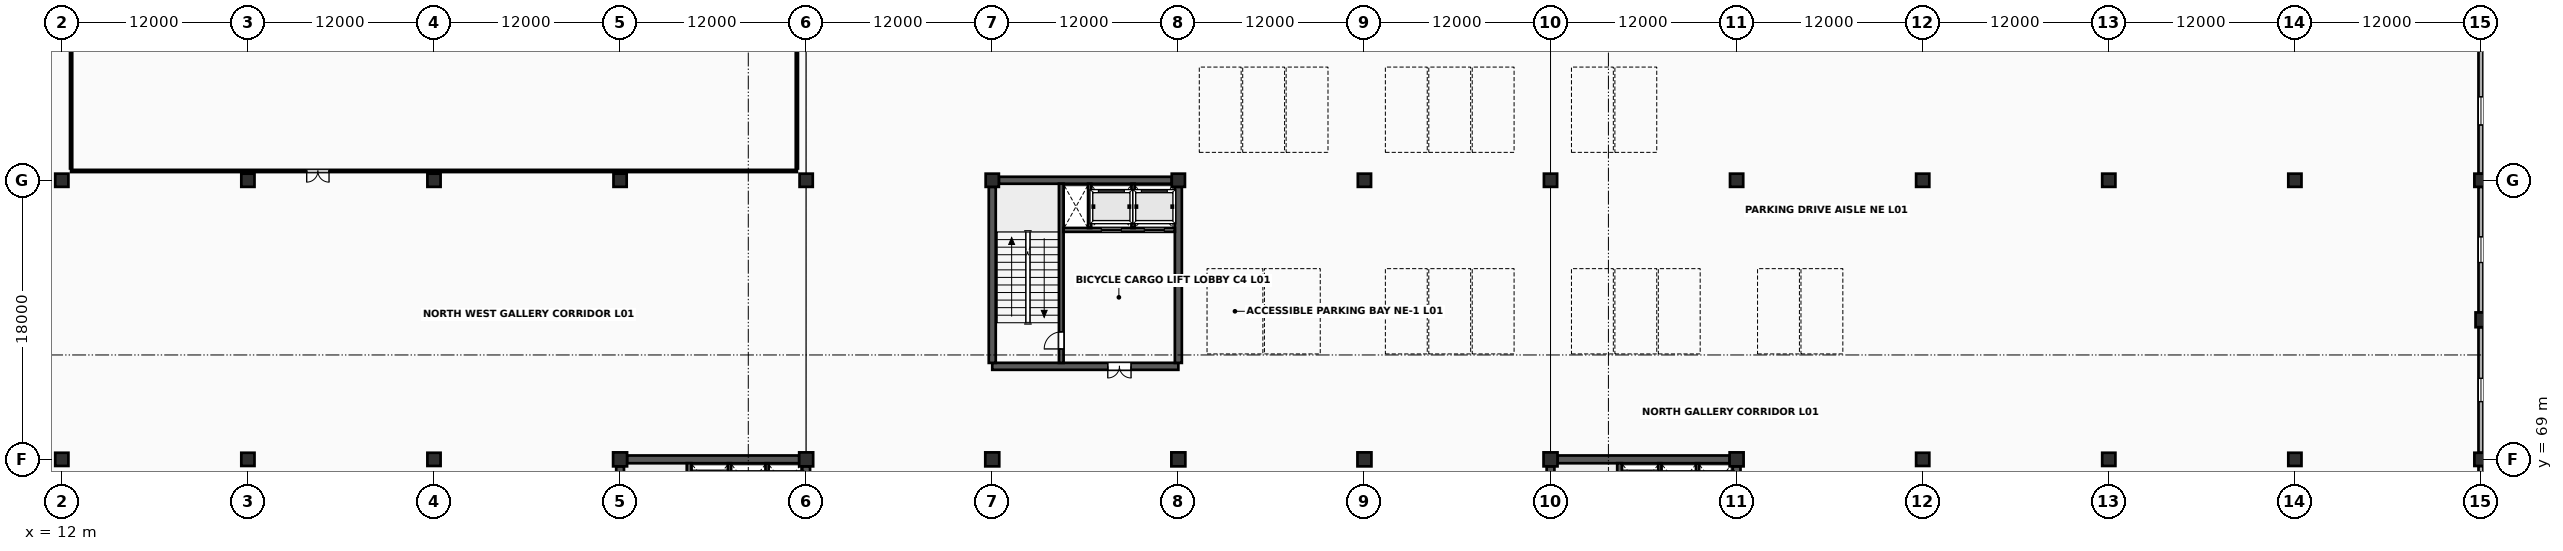
"""IFC4 building model, lengths in metres.
Left out: names, types, materials, properties, quantities, classifications, styles, units other than length and angle.
Written with IfcOpenShell. Run it as: python <this file> out.ifc"""

import sys

from ifc_helpers import new_model, si_unit, direction, frame, frame_2d, origin, origin_2d, place, context, subcontext, project, spatial, rectangle, extrude, element, fill, save


model = new_model("IFC4")
c1 = context("Model", 3, precision=1e-05, world=origin(), true_north=direction((0.0, 1.0)))
c2 = subcontext(c1, "Body", "Model", "MODEL_VIEW")
j1 = project(units=[si_unit("LENGTHUNIT", "METRE"), si_unit("PLANEANGLEUNIT", "RADIAN")], contexts=[c1])
p1 = place(None, origin())
s1 = spatial("IfcSite", under=j1, at=p1, CompositionType="ELEMENT")
p2 = place(p1, origin())
s2 = spatial("IfcBuilding", under=s1, at=p2, CompositionType="ELEMENT")
p3 = place(p2, frame((0.0, 0.0, 5.4)))
s3 = spatial("IfcBuildingStorey", under=s2, at=p3, CompositionType="ELEMENT", Elevation=5.4)
for number, where, z_axis, x_axis in (
    (1, (12.0, 69.0, 0.0), (0.0, 0.0, 1.0), (1.0, 0.0, 0.0)),
    (2, (12.0, 87.0, 0.0), (0.0, 0.0, 1.0), (1.0, 0.0, 0.0)),
    (3, (24.0, 69.0, 0.0), (0.0, 0.0, 1.0), (1.0, 0.0, 0.0)),
    (4, (24.0, 87.0, 0.0), (0.0, 0.0, 1.0), (1.0, 0.0, 0.0)),
    (5, (36.0, 69.0, 0.0), (0.0, 0.0, 1.0), (1.0, 0.0, 0.0)),
    (6, (36.0, 87.0, 0.0), (0.0, 0.0, 1.0), (1.0, 0.0, 0.0)),
):
    element("IfcColumn", number, at=place(p3, frame(where, z_axis=z_axis, x_axis=x_axis)), inside=s3, PredefinedType="COLUMN", context=c2, shape_type="SweptSolid", body=[
        extrude(rectangle(XDim=0.85, YDim=0.85, at=origin_2d()), origin(), (0.0, 0.0, 1.0), 4.2),
    ])
p4 = place(p3, frame((48.0, 69.0, 0.0), z_axis=(0.0, 0.0, 1.0), x_axis=(1.0, 0.0, 0.0)))
e7 = element("IfcColumn", 7, at=p4, inside=s3, PredefinedType="COLUMN", context=c2, shape_type="SweptSolid", body=[
    extrude(rectangle(XDim=0.9, YDim=0.9, at=origin_2d()), origin(), (0.0, 0.0, 1.0), 4.2),
])
p5 = place(p3, frame((48.0, 87.0, 0.0), z_axis=(0.0, 0.0, 1.0), x_axis=(1.0, 0.0, 0.0)))
e8 = element("IfcColumn", 8, at=p5, inside=s3, PredefinedType="COLUMN", context=c2, shape_type="SweptSolid", body=[
    extrude(rectangle(XDim=0.85, YDim=0.85, at=origin_2d()), origin(), (0.0, 0.0, 1.0), 4.2),
])
p6 = place(p3, frame((60.0, 69.0, 0.0), z_axis=(0.0, 0.0, 1.0), x_axis=(1.0, 0.0, 0.0)))
e9 = element("IfcColumn", 9, at=p6, inside=s3, PredefinedType="COLUMN", context=c2, shape_type="SweptSolid", body=[
    extrude(rectangle(XDim=0.9, YDim=0.9, at=origin_2d()), origin(), (0.0, 0.0, 1.0), 4.2),
])
p7 = place(p3, frame((60.0, 87.0, 0.0), z_axis=(0.0, 0.0, 1.0), x_axis=(1.0, 0.0, 0.0)))
e10 = element("IfcColumn", 10, at=p7, inside=s3, PredefinedType="COLUMN", context=c2, shape_type="SweptSolid", body=[
    extrude(rectangle(XDim=0.85, YDim=0.85, at=origin_2d()), origin(), (0.0, 0.0, 1.0), 4.2),
])
p8 = place(p3, frame((72.0, 69.0, 0.0), z_axis=(0.0, 0.0, 1.0), x_axis=(1.0, 0.0, 0.0)))
e11 = element("IfcColumn", 11, at=p8, inside=s3, PredefinedType="COLUMN", context=c2, shape_type="SweptSolid", body=[
    extrude(rectangle(XDim=0.9, YDim=0.9, at=origin_2d()), origin(), (0.0, 0.0, 1.0), 4.2),
])
p9 = place(p3, frame((72.0, 87.0, 0.0), z_axis=(0.0, 0.0, 1.0), x_axis=(1.0, 0.0, 0.0)))
e12 = element("IfcColumn", 12, at=p9, inside=s3, PredefinedType="COLUMN", context=c2, shape_type="SweptSolid", body=[
    extrude(rectangle(XDim=0.85, YDim=0.85, at=origin_2d()), origin(), (0.0, 0.0, 1.0), 4.2),
])
p10 = place(p3, frame((84.0, 69.0, 0.0), z_axis=(0.0, 0.0, 1.0), x_axis=(1.0, 0.0, 0.0)))
e13 = element("IfcColumn", 13, at=p10, inside=s3, PredefinedType="COLUMN", context=c2, shape_type="SweptSolid", body=[
    extrude(rectangle(XDim=0.9, YDim=0.9, at=origin_2d()), origin(), (0.0, 0.0, 1.0), 4.2),
])
p11 = place(p3, frame((84.0, 87.0, 0.0), z_axis=(0.0, 0.0, 1.0), x_axis=(1.0, 0.0, 0.0)))
e14 = element("IfcColumn", 14, at=p11, inside=s3, PredefinedType="COLUMN", context=c2, shape_type="SweptSolid", body=[
    extrude(rectangle(XDim=0.85, YDim=0.85, at=origin_2d()), origin(), (0.0, 0.0, 1.0), 4.2),
])
p12 = place(p3, frame((96.0, 69.0, 0.0), z_axis=(0.0, 0.0, 1.0), x_axis=(1.0, 0.0, 0.0)))
e15 = element("IfcColumn", 15, at=p12, inside=s3, PredefinedType="COLUMN", context=c2, shape_type="SweptSolid", body=[
    extrude(rectangle(XDim=0.9, YDim=0.9, at=origin_2d()), origin(), (0.0, 0.0, 1.0), 4.2),
])
p13 = place(p3, frame((96.0, 87.0, 0.0), z_axis=(0.0, 0.0, 1.0), x_axis=(1.0, 0.0, 0.0)))
e16 = element("IfcColumn", 16, at=p13, inside=s3, PredefinedType="COLUMN", context=c2, shape_type="SweptSolid", body=[
    extrude(rectangle(XDim=0.85, YDim=0.85, at=origin_2d()), origin(), (0.0, 0.0, 1.0), 4.2),
])
p14 = place(p3, frame((108.0, 69.0, 0.0), z_axis=(0.0, 0.0, 1.0), x_axis=(1.0, 0.0, 0.0)))
e17 = element("IfcColumn", 17, at=p14, inside=s3, PredefinedType="COLUMN", context=c2, shape_type="SweptSolid", body=[
    extrude(rectangle(XDim=0.9, YDim=0.9, at=origin_2d()), origin(), (0.0, 0.0, 1.0), 4.2),
])
p15 = place(p3, frame((108.0, 87.0, 0.0), z_axis=(0.0, 0.0, 1.0), x_axis=(1.0, 0.0, 0.0)))
e18 = element("IfcColumn", 18, at=p15, inside=s3, PredefinedType="COLUMN", context=c2, shape_type="SweptSolid", body=[
    extrude(rectangle(XDim=0.85, YDim=0.85, at=origin_2d()), origin(), (0.0, 0.0, 1.0), 4.2),
])
p16 = place(p3, frame((120.0, 69.0, 0.0), z_axis=(0.0, 0.0, 1.0), x_axis=(1.0, 0.0, 0.0)))
e19 = element("IfcColumn", 19, at=p16, inside=s3, PredefinedType="COLUMN", context=c2, shape_type="SweptSolid", body=[
    extrude(rectangle(XDim=0.9, YDim=0.9, at=origin_2d()), origin(), (0.0, 0.0, 1.0), 4.2),
])
for number, where, z_axis, x_axis in (
    (20, (120.0, 87.0, 0.0), (0.0, 0.0, 1.0), (1.0, 0.0, 0.0)),
    (21, (132.0, 69.0, 0.0), (0.0, 0.0, 1.0), (1.0, 0.0, 0.0)),
    (22, (132.0, 87.0, 0.0), (0.0, 0.0, 1.0), (1.0, 0.0, 0.0)),
    (23, (144.0, 69.0, 0.0), (0.0, 0.0, 1.0), (1.0, 0.0, 0.0)),
    (24, (144.0, 87.0, 0.0), (0.0, 0.0, 1.0), (1.0, 0.0, 0.0)),
    (25, (156.0, 69.0, 0.0), (0.0, 0.0, 1.0), (1.0, 0.0, 0.0)),
    (26, (156.0, 87.0, 0.0), (0.0, 0.0, 1.0), (1.0, 0.0, 0.0)),
    (27, (168.0, 69.0, 0.0), (0.0, 0.0, 1.0), (1.0, 0.0, 0.0)),
    (28, (168.0, 87.0, 0.0), (0.0, 0.0, 1.0), (1.0, 0.0, 0.0)),
):
    element("IfcColumn", number, at=place(p3, frame(where, z_axis=z_axis, x_axis=x_axis)), inside=s3, PredefinedType="COLUMN", context=c2, shape_type="SweptSolid", body=[
        extrude(rectangle(XDim=0.85, YDim=0.85, at=origin_2d()), origin(), (0.0, 0.0, 1.0), 4.2),
    ])
p17 = place(p3, frame((168.0, 78.0, 0.0), z_axis=(0.0, 0.0, 1.0), x_axis=(1.0, 0.0, 0.0)))
e29 = element("IfcColumn", 29, at=p17, inside=s3, PredefinedType="PILASTER", context=c2, shape_type="SweptSolid", body=[
    extrude(rectangle(XDim=0.7, YDim=0.95, at=origin_2d()), origin(), (0.0, 0.0, 1.0), 4.2),
])
for number, where, z_axis, x_axis in (
    (30, (48.447, 69.0, 0.0), (0.0, 0.0, 1.0), (1.0, 0.0, 0.0)),
    (31, (48.0, 57.447, 0.0), (0.0, 0.0, 1.0), (0.0, 1.0, 0.0)),
    (32, (60.0, 57.447, 0.0), (0.0, 0.0, 1.0), (0.0, 1.0, 0.0)),
):
    element("IfcWall", number, at=place(p3, frame(where, z_axis=z_axis, x_axis=x_axis)), inside=s3, PredefinedType="SHEAR", context=c2, shape_type="SweptSolid", body=[
        extrude(rectangle(XDim=11.106, YDim=0.5, at=frame_2d((5.553, 0.0))), origin(), (0.0, 0.0, 1.0), 4.043),
    ])
p18 = place(p3, frame((52.45, 57.247, 0.0), z_axis=(0.0, 0.0, 1.0), x_axis=(0.0, 1.0, 0.0)))
e33 = element("IfcWall", 33, at=p18, inside=s3, PredefinedType="SHEAR", context=c2, shape_type="SweptSolid", body=[
    extrude(rectangle(XDim=11.506, YDim=0.3, at=frame_2d((5.753, 0.0))), origin(), (0.0, 0.0, 1.0), 4.043),
])
p19 = place(p18, frame((0.9, 0.0, 0.0)))
e34 = element("IfcOpeningElement", 34, at=p19, cuts=e33, PredefinedType="OPENING", context=c2, shape_type="SweptSolid", body=[
    extrude(rectangle(XDim=1.1, YDim=2.2, at=frame_2d((0.55, 1.1))), frame((0.0, 0.165, 0.0), z_axis=(0.0, -1.0, 0.0), x_axis=(1.0, 0.0, 0.0)), (0.0, 0.0, 1.0), 0.33),
])
for number, where, z_axis, x_axis in (
    (35, (55.05, 65.92, 0.0), (0.0, 0.0, 1.0), (0.0, 1.0, 0.0)),
    (36, (57.48, 65.92, 0.0), (0.0, 0.0, 1.0), (0.0, 1.0, 0.0)),
):
    element("IfcWall", number, at=place(p3, frame(where, z_axis=z_axis, x_axis=x_axis)), inside=s3, PredefinedType="SOLIDWALL", context=c2, shape_type="SweptSolid", body=[
        extrude(rectangle(XDim=2.83, YDim=0.2, at=frame_2d((1.415, 0.0))), origin(), (0.0, 0.0, 1.0), 4.033),
    ])
for number, where, z_axis, x_axis in (
    (37, (108.447, 69.0, 0.0), (0.0, 0.0, 1.0), (1.0, 0.0, 0.0)),
    (38, (108.0, 57.447, 0.0), (0.0, 0.0, 1.0), (0.0, 1.0, 0.0)),
    (39, (120.0, 57.447, 0.0), (0.0, 0.0, 1.0), (0.0, 1.0, 0.0)),
):
    element("IfcWall", number, at=place(p3, frame(where, z_axis=z_axis, x_axis=x_axis)), inside=s3, PredefinedType="SHEAR", context=c2, shape_type="SweptSolid", body=[
        extrude(rectangle(XDim=11.106, YDim=0.5, at=frame_2d((5.553, 0.0))), origin(), (0.0, 0.0, 1.0), 4.043),
    ])
p20 = place(p3, frame((112.45, 57.247, 0.0), z_axis=(0.0, 0.0, 1.0), x_axis=(0.0, 1.0, 0.0)))
e40 = element("IfcWall", 40, at=p20, inside=s3, PredefinedType="SHEAR", context=c2, shape_type="SweptSolid", body=[
    extrude(rectangle(XDim=11.506, YDim=0.3, at=frame_2d((5.753, 0.0))), origin(), (0.0, 0.0, 1.0), 4.043),
])
p21 = place(p20, frame((0.9, 0.0, 0.0)))
e41 = element("IfcOpeningElement", 41, at=p21, cuts=e40, PredefinedType="OPENING", context=c2, shape_type="SweptSolid", body=[
    extrude(rectangle(XDim=1.1, YDim=2.2, at=frame_2d((0.55, 1.1))), frame((0.0, 0.165, 0.0), z_axis=(0.0, -1.0, 0.0), x_axis=(1.0, 0.0, 0.0)), (0.0, 0.0, 1.0), 0.33),
])
for number, where, z_axis, x_axis in (
    (42, (115.05, 65.92, 0.0), (0.0, 0.0, 1.0), (0.0, 1.0, 0.0)),
    (43, (117.48, 65.92, 0.0), (0.0, 0.0, 1.0), (0.0, 1.0, 0.0)),
):
    element("IfcWall", number, at=place(p3, frame(where, z_axis=z_axis, x_axis=x_axis)), inside=s3, PredefinedType="SOLIDWALL", context=c2, shape_type="SweptSolid", body=[
        extrude(rectangle(XDim=2.83, YDim=0.2, at=frame_2d((1.415, 0.0))), origin(), (0.0, 0.0, 1.0), 4.033),
    ])
p22 = place(p3, frame((72.0, 75.0, 0.0), z_axis=(0.0, 0.0, 1.0), x_axis=(1.0, 0.0, 0.0)))
e44 = element("IfcWall", 44, at=p22, inside=s3, PredefinedType="SHEAR", context=c2, shape_type="SweptSolid", body=[
    extrude(rectangle(XDim=12.0, YDim=0.45, at=frame_2d((6.0, 0.0))), origin(), (0.0, 0.0, 1.0), 4.043),
])
p23 = place(p22, frame((7.45, 0.0, 0.0)))
e45 = element("IfcOpeningElement", 45, at=p23, cuts=e44, PredefinedType="OPENING", context=c2, shape_type="SweptSolid", body=[
    extrude(rectangle(XDim=1.5, YDim=2.25, at=frame_2d((0.75, 1.125))), frame((0.0, 0.24, 0.0), z_axis=(0.0, -1.0, 0.0), x_axis=(1.0, 0.0, 0.0)), (0.0, 0.0, 1.0), 0.48),
])
p24 = place(p3, frame((72.422, 87.0, 0.0), z_axis=(0.0, 0.0, 1.0), x_axis=(1.0, 0.0, 0.0)))
e46 = element("IfcWall", 46, at=p24, inside=s3, PredefinedType="SHEAR", context=c2, shape_type="SweptSolid", body=[
    extrude(rectangle(XDim=11.156, YDim=0.45, at=frame_2d((5.578, 0.0))), origin(), (0.0, 0.0, 1.0), 4.043),
])
for number, where, z_axis, x_axis in (
    (47, (72.0, 75.222, 0.0), (0.0, 0.0, 1.0), (0.0, 1.0, 0.0)),
    (48, (84.0, 75.222, 0.0), (0.0, 0.0, 1.0), (0.0, 1.0, 0.0)),
):
    element("IfcWall", number, at=place(p3, frame(where, z_axis=z_axis, x_axis=x_axis)), inside=s3, PredefinedType="SHEAR", context=c2, shape_type="SweptSolid", body=[
        extrude(rectangle(XDim=11.356, YDim=0.45, at=frame_2d((5.678, 0.0))), origin(), (0.0, 0.0, 1.0), 4.043),
    ])
p25 = place(p3, frame((76.45, 75.222, 0.0), z_axis=(0.0, 0.0, 1.0), x_axis=(0.0, 1.0, 0.0)))
e49 = element("IfcWall", 49, at=p25, inside=s3, PredefinedType="SHEAR", context=c2, shape_type="SweptSolid", body=[
    extrude(rectangle(XDim=11.556, YDim=0.3, at=frame_2d((5.778, 0.0))), origin(), (0.0, 0.0, 1.0), 4.043),
])
p26 = place(p25, frame((0.9, 0.0, 0.0)))
e50 = element("IfcOpeningElement", 50, at=p26, cuts=e49, PredefinedType="OPENING", context=c2, shape_type="SweptSolid", body=[
    extrude(rectangle(XDim=1.1, YDim=2.2, at=frame_2d((0.55, 1.1))), frame((0.0, 0.165, 0.0), z_axis=(0.0, -1.0, 0.0), x_axis=(1.0, 0.0, 0.0)), (0.0, 0.0, 1.0), 0.33),
])
p27 = place(p3, frame((76.597, 83.8, 0.0), z_axis=(0.0, 0.0, 1.0), x_axis=(1.0, 0.0, 0.0)))
e51 = element("IfcWall", 51, at=p27, inside=s3, PredefinedType="SOLIDWALL", context=c2, shape_type="SweptSolid", body=[
    extrude(rectangle(XDim=7.181, YDim=0.25, at=frame_2d((3.591, 0.0))), origin(), (0.0, 0.0, 1.0), 4.043),
])
p28 = place(p27, frame((2.433, 0.0, 0.0)))
e52 = element("IfcOpeningElement", 52, at=p28, cuts=e51, PredefinedType="OPENING", context=c2, shape_type="SweptSolid", body=[
    extrude(rectangle(XDim=1.3, YDim=2.28, at=frame_2d((0.65, 1.14))), frame((0.0, 0.14, 0.0), z_axis=(0.0, -1.0, 0.0), x_axis=(1.0, 0.0, 0.0)), (0.0, 0.0, 1.0), 0.28),
])
p29 = place(p27, frame((5.203, 0.0, 0.0)))
e53 = element("IfcOpeningElement", 53, at=p29, cuts=e51, PredefinedType="OPENING", context=c2, shape_type="SweptSolid", body=[
    extrude(rectangle(XDim=1.3, YDim=2.28, at=frame_2d((0.65, 1.14))), frame((0.0, 0.14, 0.0), z_axis=(0.0, -1.0, 0.0), x_axis=(1.0, 0.0, 0.0)), (0.0, 0.0, 1.0), 0.28),
])
for number, where, z_axis, x_axis in (
    (54, (78.28, 83.92, 0.0), (0.0, 0.0, 1.0), (0.0, 1.0, 0.0)),
    (55, (81.08, 83.92, 0.0), (0.0, 0.0, 1.0), (0.0, 1.0, 0.0)),
):
    element("IfcWall", number, at=place(p3, frame(where, z_axis=z_axis, x_axis=x_axis)), inside=s3, PredefinedType="SOLIDWALL", context=c2, shape_type="SweptSolid", body=[
        extrude(rectangle(XDim=2.855, YDim=0.2, at=frame_2d((1.427, 0.0))), origin(), (0.0, 0.0, 1.0), 4.033),
    ])
p30 = place(p3, frame((168.0, 57.423, 0.0), z_axis=(0.0, 0.0, 1.0), x_axis=(0.0, 1.0, 0.0)))
e56 = element("IfcWall", 56, at=p30, inside=s3, PredefinedType="SOLIDWALL", context=c2, shape_type="SweptSolid", body=[
    extrude(rectangle(XDim=11.154, YDim=0.32, at=frame_2d((5.577, 0.0))), origin(), (0.0, 0.0, 1.0), 2.69),
])
p31 = place(p30, frame((4.907, 0.0, 0.55)))
e57 = element("IfcOpeningElement", 57, at=p31, cuts=e56, PredefinedType="OPENING", context=c2, shape_type="SweptSolid", body=[
    extrude(rectangle(XDim=1.34, YDim=1.58, at=frame_2d((0.67, 0.79))), frame((0.0, 0.175, 0.0), z_axis=(0.0, -1.0, 0.0), x_axis=(1.0, 0.0, 0.0)), (0.0, 0.0, 1.0), 0.35),
])
p32 = place(p3, frame((168.0, 69.423, 0.0), z_axis=(0.0, 0.0, 1.0), x_axis=(0.0, 1.0, 0.0)))
e58 = element("IfcWall", 58, at=p32, inside=s3, PredefinedType="SOLIDWALL", context=c2, shape_type="SweptSolid", body=[
    extrude(rectangle(XDim=8.104, YDim=0.32, at=frame_2d((4.052, 0.0))), origin(), (0.0, 0.0, 1.0), 2.69),
])
p33 = place(p32, frame((3.302, 0.0, 0.55)))
e59 = element("IfcOpeningElement", 59, at=p33, cuts=e58, PredefinedType="OPENING", context=c2, shape_type="SweptSolid", body=[
    extrude(rectangle(XDim=1.5, YDim=1.58, at=frame_2d((0.75, 0.79))), frame((0.0, 0.175, 0.0), z_axis=(0.0, -1.0, 0.0), x_axis=(1.0, 0.0, 0.0)), (0.0, 0.0, 1.0), 0.35),
])
p34 = place(p3, frame((168.0, 78.473, 0.0), z_axis=(0.0, 0.0, 1.0), x_axis=(0.0, 1.0, 0.0)))
e60 = element("IfcWall", 60, at=p34, inside=s3, PredefinedType="SOLIDWALL", context=c2, shape_type="SweptSolid", body=[
    extrude(rectangle(XDim=8.104, YDim=0.32, at=frame_2d((4.052, 0.0))), origin(), (0.0, 0.0, 1.0), 2.69),
])
p35 = place(p34, frame((3.222, 0.0, 0.55)))
e61 = element("IfcOpeningElement", 61, at=p35, cuts=e60, PredefinedType="OPENING", context=c2, shape_type="SweptSolid", body=[
    extrude(rectangle(XDim=1.66, YDim=1.58, at=frame_2d((0.83, 0.79))), frame((0.0, 0.175, 0.0), z_axis=(0.0, -1.0, 0.0), x_axis=(1.0, 0.0, 0.0)), (0.0, 0.0, 1.0), 0.35),
])
p36 = place(p3, frame((168.0, 87.423, 0.0), z_axis=(0.0, 0.0, 1.0), x_axis=(0.0, 1.0, 0.0)))
e62 = element("IfcWall", 62, at=p36, inside=s3, PredefinedType="SOLIDWALL", context=c2, shape_type="SweptSolid", body=[
    extrude(rectangle(XDim=8.104, YDim=0.32, at=frame_2d((4.052, 0.0))), origin(), (0.0, 0.0, 1.0), 2.69),
])
p37 = place(p36, frame((3.142, 0.0, 0.55)))
e63 = element("IfcOpeningElement", 63, at=p37, cuts=e62, PredefinedType="OPENING", context=c2, shape_type="SweptSolid", body=[
    extrude(rectangle(XDim=1.82, YDim=1.58, at=frame_2d((0.91, 0.79))), frame((0.0, 0.175, 0.0), z_axis=(0.0, -1.0, 0.0), x_axis=(1.0, 0.0, 0.0)), (0.0, 0.0, 1.0), 0.35),
])
p38 = place(p3, frame((12.6, 87.6, 0.0), z_axis=(0.0, 0.0, 1.0), x_axis=(1.0, 0.0, 0.0)))
e64 = element("IfcWall", 64, at=p38, inside=s3, PredefinedType="PARTITIONING", context=c2, shape_type="SweptSolid", body=[
    extrude(rectangle(XDim=46.8, YDim=0.14, at=frame_2d((23.4, 0.0))), origin(), (0.0, 0.0, 1.0), 2.75),
])
p39 = place(p38, frame((15.192, 0.0, 0.0)))
e65 = element("IfcOpeningElement", 65, at=p39, cuts=e64, PredefinedType="OPENING", context=c2, shape_type="SweptSolid", body=[
    extrude(rectangle(XDim=1.44, YDim=2.26, at=frame_2d((0.72, 1.13))), frame((0.0, 0.085, 0.0), z_axis=(0.0, -1.0, 0.0), x_axis=(1.0, 0.0, 0.0)), (0.0, 0.0, 1.0), 0.17),
])
for number, where, z_axis, x_axis in (
    (66, (12.6, 87.76, 0.0), (0.0, 0.0, 1.0), (0.0, 1.0, 0.0)),
    (67, (59.4, 87.76, 0.0), (0.0, 0.0, 1.0), (0.0, 1.0, 0.0)),
):
    element("IfcWall", number, at=place(p3, frame(where, z_axis=z_axis, x_axis=x_axis)), inside=s3, PredefinedType="PARTITIONING", context=c2, shape_type="SweptSolid", body=[
        extrude(rectangle(XDim=26.1, YDim=0.14, at=frame_2d((13.05, 0.0))), origin(), (0.0, 0.0, 1.0), 2.75),
    ])
p40 = place(p33, origin())
e68 = element("IfcWindow", 68, at=p40, inside=s3, PartitioningType="SINGLE_PANEL", PredefinedType="WINDOW", context=c2, shape_type="SweptSolid", body=[
    extrude(rectangle(XDim=1.5, YDim=1.58, at=frame_2d((0.75, 0.79))), frame((0.0, 0.03, 0.0), z_axis=(0.0, -1.0, 0.0), x_axis=(1.0, 0.0, 0.0)), (0.0, 0.0, 1.0), 0.06),
])
fill(e59, e68)
p41 = place(p35, origin())
e69 = element("IfcWindow", 69, at=p41, inside=s3, PartitioningType="SINGLE_PANEL", PredefinedType="WINDOW", context=c2, shape_type="SweptSolid", body=[
    extrude(rectangle(XDim=1.66, YDim=1.58, at=frame_2d((0.83, 0.79))), frame((0.0, 0.03, 0.0), z_axis=(0.0, -1.0, 0.0), x_axis=(1.0, 0.0, 0.0)), (0.0, 0.0, 1.0), 0.06),
])
fill(e61, e69)
p42 = place(p37, origin())
e70 = element("IfcWindow", 70, at=p42, inside=s3, PartitioningType="DOUBLE_PANEL_VERTICAL", PredefinedType="WINDOW", context=c2, shape_type="SweptSolid", body=[
    extrude(rectangle(XDim=1.82, YDim=1.58, at=frame_2d((0.91, 0.79))), frame((0.0, 0.03, 0.0), z_axis=(0.0, -1.0, 0.0), x_axis=(1.0, 0.0, 0.0)), (0.0, 0.0, 1.0), 0.06),
])
fill(e63, e70)
p43 = place(p26, origin())
e71 = element("IfcDoor", 71, at=p43, inside=s3, OperationType="SINGLE_SWING_LEFT", PredefinedType="DOOR", context=c2, shape_type="SweptSolid", body=[
    extrude(rectangle(XDim=1.1, YDim=2.2, at=frame_2d((0.55, 1.1))), frame((0.0, 0.025, 0.0), z_axis=(0.0, -1.0, 0.0), x_axis=(1.0, 0.0, 0.0)), (0.0, 0.0, 1.0), 0.05),
])
fill(e50, e71)
p44 = place(p23, origin())
e72 = element("IfcDoor", 72, at=p44, inside=s3, OperationType="DOUBLE_DOOR_SINGLE_SWING", PredefinedType="DOOR", context=c2, shape_type="SweptSolid", body=[
    extrude(rectangle(XDim=1.5, YDim=2.25, at=frame_2d((0.75, 1.125))), frame((0.0, 0.025, 0.0), z_axis=(0.0, -1.0, 0.0), x_axis=(1.0, 0.0, 0.0)), (0.0, 0.0, 1.0), 0.05),
])
fill(e45, e72)
p45 = place(p28, origin())
e73 = element("IfcDoor", 73, at=p45, inside=s3, OperationType="SLIDING_TO_LEFT", PredefinedType="USERDEFINED", context=c2, shape_type="SweptSolid", body=[
    extrude(rectangle(XDim=1.3, YDim=2.28, at=frame_2d((0.65, 1.14))), frame((0.0, 0.025, 0.0), z_axis=(0.0, -1.0, 0.0), x_axis=(1.0, 0.0, 0.0)), (0.0, 0.0, 1.0), 0.05),
])
fill(e52, e73)
p46 = place(p29, origin())
e74 = element("IfcDoor", 74, at=p46, inside=s3, OperationType="SLIDING_TO_LEFT", PredefinedType="USERDEFINED", context=c2, shape_type="SweptSolid", body=[
    extrude(rectangle(XDim=1.3, YDim=2.28, at=frame_2d((0.65, 1.14))), frame((0.0, 0.025, 0.0), z_axis=(0.0, -1.0, 0.0), x_axis=(1.0, 0.0, 0.0)), (0.0, 0.0, 1.0), 0.05),
])
fill(e53, e74)
p47 = place(p39, origin())
e75 = element("IfcDoor", 75, at=p47, inside=s3, OperationType="DOUBLE_DOOR_SINGLE_SWING", PredefinedType="DOOR", context=c2, shape_type="SweptSolid", body=[
    extrude(rectangle(XDim=1.44, YDim=2.26, at=frame_2d((0.72, 1.13))), frame((0.0, 0.025, 0.0), z_axis=(0.0, -1.0, 0.0), x_axis=(1.0, 0.0, 0.0)), (0.0, 0.0, 1.0), 0.05),
])
fill(e65, e75)
save(model, sys.argv[1])
